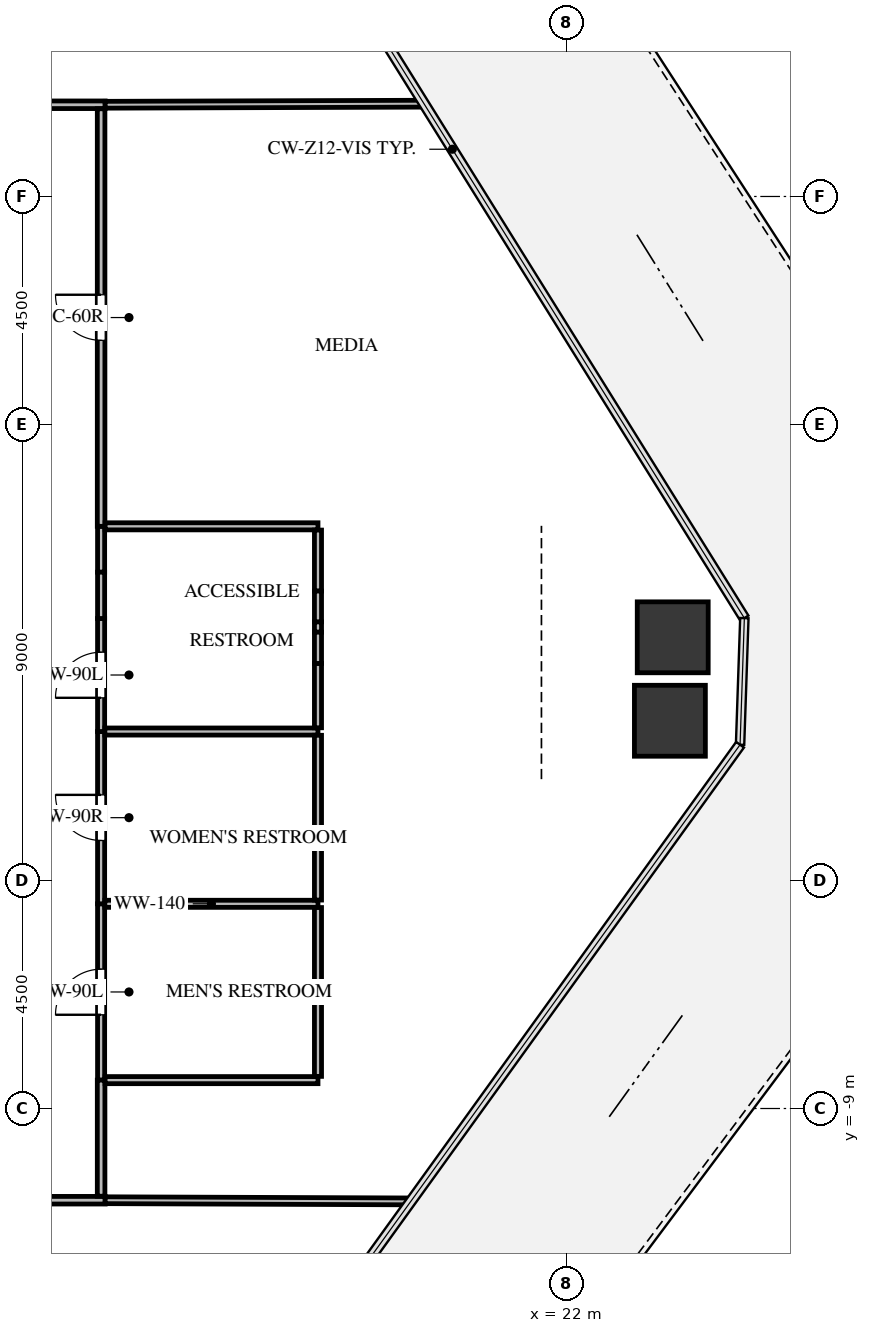
"""IFC4 building model, lengths in metres.
Left out: names, types, materials, properties, quantities, classifications, styles, units other than length and angle.
Written with IfcOpenShell. Run it as: python <this file> out.ifc"""

import sys

from ifc_helpers import new_model, si_unit, direction, frame, frame_2d, origin, origin_2d, place, context, subcontext, project, spatial, rectangle, extrude, source, transform, mapped, element, fill, save


model = new_model("IFC4")
c1 = context("Model", 3, precision=1e-05, world=origin(), true_north=direction((0.0, 1.0)))
c2 = subcontext(c1, "Body", "Model", "MODEL_VIEW")
j1 = project(units=[si_unit("LENGTHUNIT", "METRE"), si_unit("PLANEANGLEUNIT", "RADIAN")], contexts=[c1])
p1 = place(None, origin())
s1 = spatial("IfcSite", under=j1, at=p1, CompositionType="ELEMENT")
p2 = place(p1, origin())
s2 = spatial("IfcBuilding", under=s1, at=p2, CompositionType="ELEMENT")
p3 = place(p2, frame((0.0, 0.0, 32.4)))
s3 = spatial("IfcBuildingStorey", under=s2, at=p3, CompositionType="ELEMENT", Elevation=32.4)
m1 = source(origin(), c2, "Body", "SweptSolid", [
    extrude(rectangle(XDim=1.4, YDim=1.4, at=origin_2d()), origin(), (0.0, 0.0, 1.0), 3.3),
])
for number, where, z_axis, x_axis in (
    (1, (24.091, 0.3, -0.24), (0.0, 0.0, 1.0), (1.0, 0.0, 0.0)),
    (2, (24.035, -1.347, -0.24), (0.0, 0.0, 1.0), (1.0, 0.0, 0.0)),
):
    element("IfcColumn", number, at=place(p3, frame(where, z_axis=z_axis, x_axis=x_axis)), inside=s3, PredefinedType="COLUMN", context=c2, shape_type="MappedRepresentation", body=[
        mapped(m1, transform((0.0, 0.0, 0.0), x_axis=(1.0, 0.0, 0.0), y_axis=(0.0, 1.0, 0.0), z_axis=(0.0, 0.0, 1.0), scale=1.0)),
    ])
p4 = place(p3, frame((12.81, -8.44, 0.0), z_axis=(0.0, 0.0, 1.0), x_axis=(0.0, 1.0, 0.0)))
e3 = element("IfcWall", 3, at=p4, inside=s3, PredefinedType="PARTITIONING", context=c2, shape_type="SweptSolid", body=[
    extrude(rectangle(XDim=3.48, YDim=0.14, at=frame_2d((1.74, 0.0))), origin(), (0.0, 0.0, 1.0), 3.045),
])
p5 = place(p4, frame((1.29, 0.0, 0.0)))
e4 = element("IfcOpeningElement", 4, at=p5, cuts=e3, PredefinedType="OPENING", context=c2, shape_type="SweptSolid", body=[
    extrude(rectangle(XDim=0.9, YDim=2.05, at=frame_2d((0.45, 1.025))), frame((0.0, 0.08, 0.0), z_axis=(0.0, -1.0, 0.0), x_axis=(1.0, 0.0, 0.0)), (0.0, 0.0, 1.0), 0.16),
])
p6 = place(p3, frame((12.81, -4.96, 0.0), z_axis=(0.0, 0.0, 1.0), x_axis=(0.0, 1.0, 0.0)))
e5 = element("IfcWall", 5, at=p6, inside=s3, PredefinedType="PARTITIONING", context=c2, shape_type="SweptSolid", body=[
    extrude(rectangle(XDim=3.4, YDim=0.14, at=frame_2d((1.7, 0.0))), origin(), (0.0, 0.0, 1.0), 3.045),
])
p7 = place(p6, frame((1.25, 0.0, 0.0)))
e6 = element("IfcOpeningElement", 6, at=p7, cuts=e5, PredefinedType="OPENING", context=c2, shape_type="SweptSolid", body=[
    extrude(rectangle(XDim=0.9, YDim=2.05, at=frame_2d((0.45, 1.025))), frame((0.0, 0.08, 0.0), z_axis=(0.0, -1.0, 0.0), x_axis=(1.0, 0.0, 0.0)), (0.0, 0.0, 1.0), 0.16),
])
p8 = place(p3, frame((12.81, -1.56, 0.0), z_axis=(0.0, 0.0, 1.0), x_axis=(0.0, 1.0, 0.0)))
e7 = element("IfcWall", 7, at=p8, inside=s3, PredefinedType="PARTITIONING", context=c2, shape_type="SweptSolid", body=[
    extrude(rectangle(XDim=2.231, YDim=0.14, at=frame_2d((1.116, 0.0))), origin(), (0.0, 0.0, 1.0), 3.045),
])
p9 = place(p8, frame((0.666, 0.0, 0.0)))
e8 = element("IfcOpeningElement", 8, at=p9, cuts=e7, PredefinedType="OPENING", context=c2, shape_type="SweptSolid", body=[
    extrude(rectangle(XDim=0.9, YDim=2.05, at=frame_2d((0.45, 1.025))), frame((0.0, 0.08, 0.0), z_axis=(0.0, -1.0, 0.0), x_axis=(1.0, 0.0, 0.0)), (0.0, 0.0, 1.0), 0.16),
])
p10 = place(p3, frame((12.81, 1.585, 0.0), z_axis=(0.0, 0.0, 1.0), x_axis=(0.0, 1.0, 0.0)))
e9 = element("IfcWall", 9, at=p10, inside=s3, PredefinedType="PARTITIONING", context=c2, shape_type="SweptSolid", body=[
    extrude(rectangle(XDim=0.905, YDim=0.14, at=frame_2d((0.453, 0.0))), origin(), (0.0, 0.0, 1.0), 3.045),
])
p11 = place(p3, frame((12.81, 0.671, 0.0), z_axis=(0.0, 0.0, 1.0), x_axis=(0.0, 1.0, 0.0)))
e10 = element("IfcWall", 10, at=p11, inside=s3, PredefinedType="PARTITIONING", context=c2, shape_type="SweptSolid", body=[
    extrude(rectangle(XDim=0.914, YDim=0.14, at=frame_2d((0.457, 0.0))), origin(), (0.0, 0.0, 1.0), 2.13),
])
p12 = place(p3, frame((12.89, 10.81, 0.0), z_axis=(0.0, 0.0, 1.0), x_axis=(-1.0, 0.0, 0.0)))
e11 = element("IfcWall", 11, at=p12, inside=s3, PredefinedType="PARTITIONING", context=c2, shape_type="SweptSolid", body=[
    extrude(rectangle(XDim=1.847, YDim=0.15, at=frame_2d((0.924, 0.0))), origin(), (0.0, 0.0, 1.0), 3.045),
])
p13 = place(p3, frame((5.817, -10.81, 0.0), z_axis=(0.0, 0.0, 1.0), x_axis=(1.0, 0.0, 0.0)))
e12 = element("IfcWall", 12, at=p13, inside=s3, PredefinedType="PARTITIONING", context=c2, shape_type="SweptSolid", body=[
    extrude(rectangle(XDim=7.073, YDim=0.15, at=frame_2d((3.536, 0.0))), origin(), (0.0, 0.0, 1.0), 2.13),
])
p14 = place(p3, frame((12.81, 2.49, 0.0), z_axis=(0.0, 0.0, 1.0), x_axis=(0.0, 1.0, 0.0)))
e13 = element("IfcWall", 13, at=p14, inside=s3, PredefinedType="PARTITIONING", context=c2, shape_type="SweptSolid", body=[
    extrude(rectangle(XDim=8.241, YDim=0.15, at=frame_2d((4.121, 0.0))), origin(), (0.0, 0.0, 1.0), 3.045),
])
p15 = place(p14, frame((3.67, 0.0, 0.0)))
e14 = element("IfcOpeningElement", 14, at=p15, cuts=e13, PredefinedType="OPENING", context=c2, shape_type="SweptSolid", body=[
    extrude(rectangle(XDim=0.9, YDim=2.05, at=frame_2d((0.45, 1.025))), frame((0.0, 0.085, 0.0), z_axis=(0.0, -1.0, 0.0), x_axis=(1.0, 0.0, 0.0)), (0.0, 0.0, 1.0), 0.17),
])
p16 = place(p3, frame((12.81, -10.731, 0.0), z_axis=(0.0, 0.0, 1.0), x_axis=(0.0, 1.0, 0.0)))
e15 = element("IfcWall", 15, at=p16, inside=s3, PredefinedType="PARTITIONING", context=c2, shape_type="SweptSolid", body=[
    extrude(rectangle(XDim=2.291, YDim=0.15, at=frame_2d((1.146, 0.0))), origin(), (0.0, 0.0, 1.0), 3.045),
])
p17 = place(p3, frame((12.884, -4.96, 0.0), z_axis=(0.0, 0.0, 1.0), x_axis=(1.0, 0.0, 0.0)))
e16 = element("IfcWall", 16, at=p17, inside=s3, PredefinedType="PARTITIONING", context=c2, shape_type="SweptSolid", body=[
    extrude(rectangle(XDim=4.206, YDim=0.14, at=frame_2d((2.103, 0.0))), origin(), (0.0, 0.0, 1.0), 3.045),
])
p18 = place(p3, frame((17.09, -8.44, 0.0), z_axis=(0.0, 0.0, 1.0), x_axis=(-1.0, 0.0, 0.0)))
e17 = element("IfcWall", 17, at=p18, inside=s3, PredefinedType="PARTITIONING", context=c2, shape_type="SweptSolid", body=[
    extrude(rectangle(XDim=4.201, YDim=0.14, at=frame_2d((2.101, 0.0))), origin(), (0.0, 0.0, 1.0), 3.045),
])
p19 = place(p3, frame((17.09, -5.034, 0.0), z_axis=(0.0, 0.0, 1.0), x_axis=(0.0, -1.0, 0.0)))
e18 = element("IfcWall", 18, at=p19, inside=s3, PredefinedType="PARTITIONING", context=c2, shape_type="SweptSolid", body=[
    extrude(rectangle(XDim=3.332, YDim=0.14, at=frame_2d((1.666, 0.0))), origin(), (0.0, 0.0, 1.0), 3.045),
])
p20 = place(p3, frame((12.884, -1.56, 0.0), z_axis=(0.0, 0.0, 1.0), x_axis=(1.0, 0.0, 0.0)))
e19 = element("IfcWall", 19, at=p20, inside=s3, PredefinedType="PARTITIONING", context=c2, shape_type="SweptSolid", body=[
    extrude(rectangle(XDim=4.206, YDim=0.14, at=frame_2d((2.103, 0.0))), origin(), (0.0, 0.0, 1.0), 3.045),
])
p21 = place(p3, frame((17.09, -1.634, 0.0), z_axis=(0.0, 0.0, 1.0), x_axis=(0.0, -1.0, 0.0)))
e20 = element("IfcWall", 20, at=p21, inside=s3, PredefinedType="PARTITIONING", context=c2, shape_type="SweptSolid", body=[
    extrude(rectangle(XDim=3.252, YDim=0.14, at=frame_2d((1.626, 0.0))), origin(), (0.0, 0.0, 1.0), 3.045),
])
p22 = place(p3, frame((12.889, 2.49, 0.0), z_axis=(0.0, 0.0, 1.0), x_axis=(1.0, 0.0, 0.0)))
e21 = element("IfcWall", 21, at=p22, inside=s3, PredefinedType="PARTITIONING", context=c2, shape_type="SweptSolid", body=[
    extrude(rectangle(XDim=4.201, YDim=0.14, at=frame_2d((2.101, 0.0))), origin(), (0.0, 0.0, 1.0), 3.045),
])
p23 = place(p3, frame((17.09, 2.416, 0.0), z_axis=(0.0, 0.0, 1.0), x_axis=(0.0, -1.0, 0.0)))
e22 = element("IfcWall", 22, at=p23, inside=s3, PredefinedType="PARTITIONING", context=c2, shape_type="SweptSolid", body=[
    extrude(rectangle(XDim=1.204, YDim=0.14, at=frame_2d((0.602, 0.0))), origin(), (0.0, 0.0, 1.0), 3.045),
])
p24 = place(p3, frame((17.09, 0.606, 0.0), z_axis=(0.0, 0.0, 1.0), x_axis=(0.0, -1.0, 0.0)))
e23 = element("IfcWall", 23, at=p24, inside=s3, PredefinedType="PARTITIONING", context=c2, shape_type="SweptSolid", body=[
    extrude(rectangle(XDim=0.205, YDim=0.14, at=frame_2d((0.103, 0.0))), origin(), (0.0, 0.0, 1.0), 3.045),
])
p25 = place(p3, frame((17.09, -0.216, 0.0), z_axis=(0.0, 0.0, 1.0), x_axis=(0.0, -1.0, 0.0)))
e24 = element("IfcWall", 24, at=p25, inside=s3, PredefinedType="PARTITIONING", context=c2, shape_type="SweptSolid", body=[
    extrude(rectangle(XDim=1.27, YDim=0.14, at=frame_2d((0.635, 0.0))), origin(), (0.0, 0.0, 1.0), 3.045),
])
p26 = place(p3, frame((17.09, 1.212, 0.0), z_axis=(0.0, 0.0, 1.0), x_axis=(0.0, -1.0, 0.0)))
e25 = element("IfcWall", 25, at=p26, inside=s3, PredefinedType="PARTITIONING", context=c2, shape_type="SweptSolid", body=[
    extrude(rectangle(XDim=0.606, YDim=0.14, at=frame_2d((0.303, 0.0))), origin(), (0.0, 0.0, 1.0), 2.13),
])
p27 = place(p3, frame((17.09, 0.401, 0.0), z_axis=(0.0, 0.0, 1.0), x_axis=(0.0, -1.0, 0.0)))
e26 = element("IfcWall", 26, at=p27, inside=s3, PredefinedType="PARTITIONING", context=c2, shape_type="SweptSolid", body=[
    extrude(rectangle(XDim=0.617, YDim=0.14, at=frame_2d((0.309, 0.0))), origin(), (0.0, 0.0, 1.0), 2.13),
])
p28 = place(p3, frame((19.182, 10.831, 0.0), z_axis=(0.0, 0.0, 1.0), x_axis=(-0.999994432845, -0.003336806783, 0.0)))
e27 = element("IfcWall", 27, at=p28, inside=s3, PredefinedType="PARTITIONING", context=c2, shape_type="SweptSolid", body=[
    extrude(rectangle(XDim=6.292, YDim=0.135, at=frame_2d((3.146, 0.0))), origin(), (0.0, 0.0, 1.0), 2.38),
])
p29 = place(p3, frame((12.89, -10.81, 0.0), z_axis=(0.0, 0.0, 1.0), x_axis=(0.999992607823, -0.003845035728, 0.0)))
e28 = element("IfcWall", 28, at=p29, inside=s3, PredefinedType="PARTITIONING", context=c2, shape_type="SweptSolid", body=[
    extrude(rectangle(XDim=6.032, YDim=0.135, at=frame_2d((3.016, 0.0))), origin(), (0.0, 0.0, 1.0), 2.38),
])
m2 = source(origin(), c2, "Body", "SweptSolid", [
    extrude(rectangle(XDim=0.9, YDim=2.05, at=frame_2d((0.45, 1.025))), frame((0.0, 0.025, 0.0), z_axis=(0.0, -1.0, 0.0), x_axis=(1.0, 0.0, 0.0)), (0.0, 0.0, 1.0), 0.05),
])
p30 = place(p5, origin())
e29 = element("IfcDoor", 29, at=p30, inside=s3, OperationType="SINGLE_SWING_LEFT", PredefinedType="DOOR", context=c2, shape_type="MappedRepresentation", body=[
    mapped(m2, transform((0.0, 0.0, 0.0), x_axis=(1.0, 0.0, 0.0), y_axis=(0.0, 1.0, 0.0), z_axis=(0.0, 0.0, 1.0), scale=1.0)),
])
fill(e4, e29)
m3 = source(origin(), c2, "Body", "SweptSolid", [
    extrude(rectangle(XDim=0.9, YDim=2.05, at=frame_2d((0.45, 1.025))), frame((0.0, 0.025, 0.0), z_axis=(0.0, -1.0, 0.0), x_axis=(1.0, 0.0, 0.0)), (0.0, 0.0, 1.0), 0.05),
])
p31 = place(p7, origin())
e30 = element("IfcDoor", 30, at=p31, inside=s3, OperationType="SINGLE_SWING_RIGHT", PredefinedType="DOOR", context=c2, shape_type="MappedRepresentation", body=[
    mapped(m3, transform((0.0, 0.0, 0.0), x_axis=(1.0, 0.0, 0.0), y_axis=(0.0, 1.0, 0.0), z_axis=(0.0, 0.0, 1.0), scale=1.0)),
])
fill(e6, e30)
p32 = place(p9, origin())
e31 = element("IfcDoor", 31, at=p32, inside=s3, OperationType="SINGLE_SWING_LEFT", PredefinedType="DOOR", context=c2, shape_type="MappedRepresentation", body=[
    mapped(m2, transform((0.0, 0.0, 0.0), x_axis=(1.0, 0.0, 0.0), y_axis=(0.0, 1.0, 0.0), z_axis=(0.0, 0.0, 1.0), scale=1.0)),
])
fill(e8, e31)
m4 = source(origin(), c2, "Body", "SweptSolid", [
    extrude(rectangle(XDim=0.9, YDim=2.05, at=frame_2d((0.45, 1.025))), frame((0.0, 0.025, 0.0), z_axis=(0.0, -1.0, 0.0), x_axis=(1.0, 0.0, 0.0)), (0.0, 0.0, 1.0), 0.05),
])
p33 = place(p15, origin())
e32 = element("IfcDoor", 32, at=p33, inside=s3, OperationType="SINGLE_SWING_RIGHT", PredefinedType="DOOR", context=c2, shape_type="MappedRepresentation", body=[
    mapped(m4, transform((0.0, 0.0, 0.0), x_axis=(1.0, 0.0, 0.0), y_axis=(0.0, 1.0, 0.0), z_axis=(0.0, 0.0, 1.0), scale=1.0)),
])
fill(e14, e32)
save(model, sys.argv[1])
